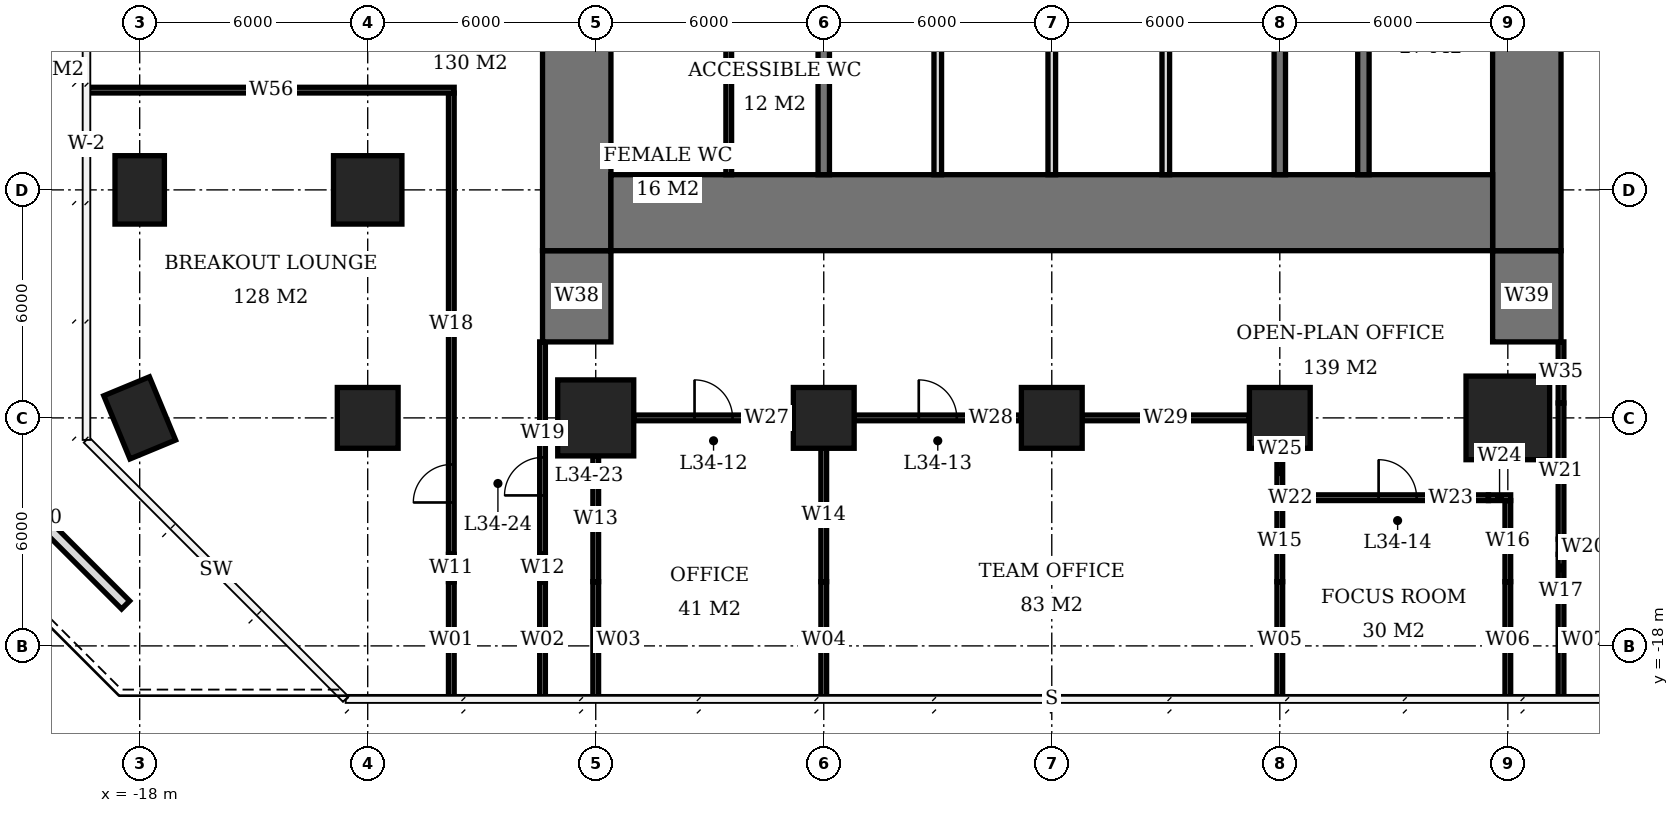
"""IFC4 building model, lengths in metres.
Left out: names, types, materials, properties, quantities, classifications, styles, units other than length and angle.
Written with IfcOpenShell. Run it as: python <this file> out.ifc"""

import sys

from ifc_helpers import new_model, si_unit, direction, frame, frame_2d, origin, origin_2d, place, context, subcontext, project, spatial, rectangle, extrude, element, fill, save


model = new_model("IFC4")
c1 = context("Model", 3, precision=1e-05, world=origin(), true_north=direction((0.0, 1.0)))
c2 = subcontext(c1, "Body", "Model", "MODEL_VIEW")
j1 = project(units=[si_unit("LENGTHUNIT", "METRE"), si_unit("PLANEANGLEUNIT", "RADIAN")], contexts=[c1])
p1 = place(None, origin())
s1 = spatial("IfcSite", under=j1, at=p1, CompositionType="ELEMENT")
p2 = place(p1, origin())
s2 = spatial("IfcBuilding", under=s1, at=p2, CompositionType="ELEMENT")
p3 = place(p2, frame((0.0, 0.0, 140.6)))
s3 = spatial("IfcBuildingStorey", under=s2, at=p3, CompositionType="ELEMENT", Elevation=140.6)
for number, where, z_axis, x_axis in (
    (1, (-18.0, -12.0, 0.0), (0.0, 0.0, 1.0), (-0.383, 0.924, 0.0)),
    (2, (-18.0, -6.0, 0.0), (0.0, 0.0, 1.0), (0.0, 1.0, 0.0)),
):
    element("IfcColumn", number, at=place(p3, frame(where, z_axis=z_axis, x_axis=x_axis)), inside=s3, PredefinedType="COLUMN", context=c2, shape_type="SweptSolid", body=[
        extrude(rectangle(XDim=1.8, YDim=1.3, at=origin_2d()), origin(), (0.0, 0.0, 1.0), 3.9),
    ])
p4 = place(p3, frame((-12.0, -12.0, 0.0), z_axis=(0.0, 0.0, 1.0), x_axis=(1.0, 0.0, 0.0)))
e3 = element("IfcColumn", 3, at=p4, inside=s3, PredefinedType="COLUMN", context=c2, shape_type="SweptSolid", body=[
    extrude(rectangle(XDim=1.6, YDim=1.6, at=origin_2d()), origin(), (0.0, 0.0, 1.0), 3.9),
])
p5 = place(p3, frame((-12.0, -6.0, 0.0), z_axis=(0.0, 0.0, 1.0), x_axis=(1.0, 0.0, 0.0)))
e4 = element("IfcColumn", 4, at=p5, inside=s3, PredefinedType="COLUMN", context=c2, shape_type="SweptSolid", body=[
    extrude(rectangle(XDim=1.8, YDim=1.8, at=origin_2d()), origin(), (0.0, 0.0, 1.0), 3.9),
])
p6 = place(p3, frame((-6.0, -12.0, 0.0), z_axis=(0.0, 0.0, 1.0), x_axis=(1.0, 0.0, 0.0)))
e5 = element("IfcColumn", 5, at=p6, inside=s3, PredefinedType="COLUMN", context=c2, shape_type="SweptSolid", body=[
    extrude(rectangle(XDim=2.0, YDim=2.0, at=origin_2d()), origin(), (0.0, 0.0, 1.0), 3.9),
])
for number, where, z_axis, x_axis in (
    (6, (0.0, -12.0, 0.0), (0.0, 0.0, 1.0), (1.0, 0.0, 0.0)),
    (7, (6.0, -12.0, 0.0), (0.0, 0.0, 1.0), (1.0, 0.0, 0.0)),
    (8, (12.0, -12.0, 0.0), (0.0, 0.0, 1.0), (1.0, 0.0, 0.0)),
):
    element("IfcColumn", number, at=place(p3, frame(where, z_axis=z_axis, x_axis=x_axis)), inside=s3, PredefinedType="COLUMN", context=c2, shape_type="SweptSolid", body=[
        extrude(rectangle(XDim=1.6, YDim=1.6, at=origin_2d()), origin(), (0.0, 0.0, 1.0), 3.9),
    ])
p7 = place(p3, frame((18.0, -12.0, 0.0), z_axis=(0.0, 0.0, 1.0), x_axis=(1.0, 0.0, 0.0)))
e9 = element("IfcColumn", 9, at=p7, inside=s3, PredefinedType="COLUMN", context=c2, shape_type="SweptSolid", body=[
    extrude(rectangle(XDim=2.2, YDim=2.2, at=origin_2d()), origin(), (0.0, 0.0, 1.0), 3.9),
])
p8 = place(p3, frame((-5.6, -6.6, 0.0), z_axis=(0.0, 0.0, 1.0), x_axis=(1.0, 0.0, 0.0)))
e10 = element("IfcWall", 10, at=p8, inside=s3, PredefinedType="SHEAR", context=c2, shape_type="SweptSolid", body=[
    extrude(rectangle(XDim=23.2, YDim=2.0, at=frame_2d((11.6, 0.0))), origin(), (0.0, 0.0, 1.0), 3.9),
])
p9 = place(p3, frame((-6.5, -7.6, 0.0), z_axis=(0.0, 0.0, 1.0), x_axis=(0.0, 1.0, 0.0)))
e11 = element("IfcWall", 11, at=p9, inside=s3, PredefinedType="SHEAR", context=c2, shape_type="SweptSolid", body=[
    extrude(rectangle(XDim=21.2, YDim=1.8, at=frame_2d((10.6, 0.0))), origin(), (0.0, 0.0, 1.0), 3.9),
])
p10 = place(p9, frame((7.8, 0.0, 0.0)))
e12 = element("IfcOpeningElement", 12, at=p10, cuts=e11, PredefinedType="OPENING", context=c2, shape_type="SweptSolid", body=[
    extrude(rectangle(XDim=1.8, YDim=2.4, at=frame_2d((0.9, 1.2))), frame((0.0, 0.91, 0.0), z_axis=(0.0, -1.0, 0.0), x_axis=(1.0, 0.0, 0.0)), (0.0, 0.0, 1.0), 1.82),
])
p11 = place(p3, frame((18.5, -7.6, 0.0), z_axis=(0.0, 0.0, 1.0), x_axis=(0.0, 1.0, 0.0)))
e13 = element("IfcWall", 13, at=p11, inside=s3, PredefinedType="SHEAR", context=c2, shape_type="SweptSolid", body=[
    extrude(rectangle(XDim=21.2, YDim=1.8, at=frame_2d((10.6, 0.0))), origin(), (0.0, 0.0, 1.0), 3.9),
])
p12 = place(p11, frame((9.2, 0.0, 0.0)))
e14 = element("IfcOpeningElement", 14, at=p12, cuts=e13, PredefinedType="OPENING", context=c2, shape_type="SweptSolid", body=[
    extrude(rectangle(XDim=1.8, YDim=2.4, at=frame_2d((0.9, 1.2))), frame((0.0, 0.91, 0.0), z_axis=(0.0, -1.0, 0.0), x_axis=(1.0, 0.0, 0.0)), (0.0, 0.0, 1.0), 1.82),
])
for number, where, z_axis, x_axis in (
    (15, (-6.5, -10.0, 0.0), (0.0, 0.0, 1.0), (0.0, 1.0, 0.0)),
    (16, (18.5, -10.0, 0.0), (0.0, 0.0, 1.0), (0.0, 1.0, 0.0)),
):
    element("IfcWall", number, at=place(p3, frame(where, z_axis=z_axis, x_axis=x_axis)), inside=s3, PredefinedType="SHEAR", context=c2, shape_type="SweptSolid", body=[
        extrude(rectangle(XDim=2.4, YDim=1.8, at=frame_2d((1.2, 0.0))), origin(), (0.0, 0.0, 1.0), 3.9),
    ])
for number, where, z_axis, x_axis in (
    (17, (0.0, -5.6, 0.0), (0.0, 0.0, 1.0), (0.0, 1.0, 0.0)),
    (18, (12.0, -5.6, 0.0), (0.0, 0.0, 1.0), (0.0, 1.0, 0.0)),
):
    element("IfcWall", number, at=place(p3, frame(where, z_axis=z_axis, x_axis=x_axis)), inside=s3, PredefinedType="SHEAR", context=c2, shape_type="SweptSolid", body=[
        extrude(rectangle(XDim=5.45, YDim=0.3, at=frame_2d((2.725, 0.0))), origin(), (0.0, 0.0, 1.0), 3.9),
    ])
p13 = place(p3, frame((14.2, -5.6, 0.0), z_axis=(0.0, 0.0, 1.0), x_axis=(0.0, 1.0, 0.0)))
e19 = element("IfcWall", 19, at=p13, inside=s3, PredefinedType="SHEAR", context=c2, shape_type="SweptSolid", body=[
    extrude(rectangle(XDim=8.45, YDim=0.3, at=frame_2d((4.225, 0.0))), origin(), (0.0, 0.0, 1.0), 3.9),
])
for number, where, z_axis, x_axis in (
    (20, (3.0, -5.6, 0.0), (0.0, 0.0, 1.0), (0.0, 1.0, 0.0)),
    (21, (6.0, -5.6, 0.0), (0.0, 0.0, 1.0), (0.0, 1.0, 0.0)),
    (22, (9.0, -5.6, 0.0), (0.0, 0.0, 1.0), (0.0, 1.0, 0.0)),
):
    element("IfcWall", number, at=place(p3, frame(where, z_axis=z_axis, x_axis=x_axis)), inside=s3, PredefinedType="SOLIDWALL", context=c2, shape_type="SweptSolid", body=[
        extrude(rectangle(XDim=5.45, YDim=0.2, at=frame_2d((2.725, 0.0))), origin(), (0.0, 0.0, 1.0), 3.9),
    ])
p14 = place(p3, frame((-18.37, -16.923, 0.0), z_axis=(0.0, 0.0, 1.0), x_axis=(-0.707106781187, 0.707106781187, 0.0)))
e23 = element("IfcWall", 23, at=p14, inside=s3, PredefinedType="USERDEFINED", context=c2, shape_type="SweptSolid", body=[
    extrude(rectangle(XDim=6.438, YDim=0.3, at=frame_2d((3.219, 0.0))), origin(), (0.0, 0.0, 1.0), 0.6),
])
p15 = place(p3, frame((-2.5, -5.6, 0.0), z_axis=(0.0, 0.0, 1.0), x_axis=(0.0, 1.0, 0.0)))
e24 = element("IfcWall", 24, at=p15, inside=s3, PredefinedType="PLUMBINGWALL", context=c2, shape_type="SweptSolid", body=[
    extrude(rectangle(XDim=5.45, YDim=0.15, at=frame_2d((2.725, 0.0))), origin(), (0.0, 0.0, 1.0), 3.65),
])
p16 = place(p3, frame((11.85, -14.1, 0.0), z_axis=(0.0, 0.0, 1.0), x_axis=(1.0, 0.0, 0.0)))
e25 = element("IfcWall", 25, at=p16, inside=s3, PredefinedType="PARTITIONING", context=c2, shape_type="SweptSolid", body=[
    extrude(rectangle(XDim=0.86, YDim=0.15, at=frame_2d((0.43, 0.0))), origin(), (0.0, 0.0, 1.0), 2.65),
])
p17 = place(p3, frame((12.71, -14.1, 0.0), z_axis=(0.0, 0.0, 1.0), x_axis=(1.0, 0.0, 0.0)))
e26 = element("IfcWall", 26, at=p17, inside=s3, PredefinedType="PARTITIONING", context=c2, shape_type="SweptSolid", body=[
    extrude(rectangle(XDim=4.78, YDim=0.15, at=frame_2d((2.39, 0.0))), origin(), (0.0, 0.0, 1.0), 3.65),
])
p18 = place(p17, frame((1.89, 0.0, 0.0)))
e27 = element("IfcOpeningElement", 27, at=p18, cuts=e26, PredefinedType="OPENING", context=c2, shape_type="SweptSolid", body=[
    extrude(rectangle(XDim=1.0, YDim=2.1, at=frame_2d((0.5, 1.05))), frame((0.0, 0.085, 0.0), z_axis=(0.0, -1.0, 0.0), x_axis=(1.0, 0.0, 0.0)), (0.0, 0.0, 1.0), 0.17),
])
p19 = place(p3, frame((17.49, -14.1, 0.0), z_axis=(0.0, 0.0, 1.0), x_axis=(1.0, 0.0, 0.0)))
e28 = element("IfcWall", 28, at=p19, inside=s3, PredefinedType="PARTITIONING", context=c2, shape_type="SweptSolid", body=[
    extrude(rectangle(XDim=0.585, YDim=0.15, at=frame_2d((0.292, 0.0))), origin(), (0.0, 0.0, 1.0), 2.65),
])
p20 = place(p3, frame((-5.0, -12.0, 0.0), z_axis=(0.0, 0.0, 1.0), x_axis=(1.0, 0.0, 0.0)))
e29 = element("IfcWall", 29, at=p20, inside=s3, PredefinedType="PARTITIONING", context=c2, shape_type="SweptSolid", body=[
    extrude(rectangle(XDim=4.2, YDim=0.15, at=frame_2d((2.1, 0.0))), origin(), (0.0, 0.0, 1.0), 3.65),
])
p21 = place(p20, frame((1.6, 0.0, 0.0)))
e30 = element("IfcOpeningElement", 30, at=p21, cuts=e29, PredefinedType="OPENING", context=c2, shape_type="SweptSolid", body=[
    extrude(rectangle(XDim=1.0, YDim=2.1, at=frame_2d((0.5, 1.05))), frame((0.0, 0.085, 0.0), z_axis=(0.0, -1.0, 0.0), x_axis=(1.0, 0.0, 0.0)), (0.0, 0.0, 1.0), 0.17),
])
p22 = place(p3, frame((0.8, -12.0, 0.0), z_axis=(0.0, 0.0, 1.0), x_axis=(1.0, 0.0, 0.0)))
e31 = element("IfcWall", 31, at=p22, inside=s3, PredefinedType="PARTITIONING", context=c2, shape_type="SweptSolid", body=[
    extrude(rectangle(XDim=4.4, YDim=0.15, at=frame_2d((2.2, 0.0))), origin(), (0.0, 0.0, 1.0), 3.65),
])
p23 = place(p22, frame((1.7, 0.0, 0.0)))
e32 = element("IfcOpeningElement", 32, at=p23, cuts=e31, PredefinedType="OPENING", context=c2, shape_type="SweptSolid", body=[
    extrude(rectangle(XDim=1.0, YDim=2.1, at=frame_2d((0.5, 1.05))), frame((0.0, 0.085, 0.0), z_axis=(0.0, -1.0, 0.0), x_axis=(1.0, 0.0, 0.0)), (0.0, 0.0, 1.0), 0.17),
])
p24 = place(p3, frame((6.8, -12.0, 0.0), z_axis=(0.0, 0.0, 1.0), x_axis=(1.0, 0.0, 0.0)))
e33 = element("IfcWall", 33, at=p24, inside=s3, PredefinedType="PARTITIONING", context=c2, shape_type="SweptSolid", body=[
    extrude(rectangle(XDim=4.4, YDim=0.15, at=frame_2d((2.2, 0.0))), origin(), (0.0, 0.0, 1.0), 3.65),
])
p25 = place(p3, frame((-6.0, -19.4, 0.0), z_axis=(0.0, 0.0, 1.0), x_axis=(0.0, 1.0, 0.0)))
e34 = element("IfcWall", 34, at=p25, inside=s3, PredefinedType="PARTITIONING", context=c2, shape_type="SweptSolid", body=[
    extrude(rectangle(XDim=3.09, YDim=0.15, at=frame_2d((1.545, 0.0))), origin(), (0.0, 0.0, 1.0), 3.65),
])
p26 = place(p3, frame((-6.0, -16.31, 0.0), z_axis=(0.0, 0.0, 1.0), x_axis=(0.0, 1.0, 0.0)))
e35 = element("IfcWall", 35, at=p26, inside=s3, PredefinedType="PARTITIONING", context=c2, shape_type="SweptSolid", body=[
    extrude(rectangle(XDim=3.31, YDim=0.15, at=frame_2d((1.655, 0.0))), origin(), (0.0, 0.0, 1.0), 2.65),
])
p27 = place(p3, frame((0.0, -19.4, 0.0), z_axis=(0.0, 0.0, 1.0), x_axis=(0.0, 1.0, 0.0)))
e36 = element("IfcWall", 36, at=p27, inside=s3, PredefinedType="PARTITIONING", context=c2, shape_type="SweptSolid", body=[
    extrude(rectangle(XDim=3.09, YDim=0.15, at=frame_2d((1.545, 0.0))), origin(), (0.0, 0.0, 1.0), 3.65),
])
p28 = place(p3, frame((0.0, -16.31, 0.0), z_axis=(0.0, 0.0, 1.0), x_axis=(0.0, 1.0, 0.0)))
e37 = element("IfcWall", 37, at=p28, inside=s3, PredefinedType="PARTITIONING", context=c2, shape_type="SweptSolid", body=[
    extrude(rectangle(XDim=3.51, YDim=0.15, at=frame_2d((1.755, 0.0))), origin(), (0.0, 0.0, 1.0), 2.65),
])
p29 = place(p3, frame((12.0, -19.4, 0.0), z_axis=(0.0, 0.0, 1.0), x_axis=(0.0, 1.0, 0.0)))
e38 = element("IfcWall", 38, at=p29, inside=s3, PredefinedType="PARTITIONING", context=c2, shape_type="SweptSolid", body=[
    extrude(rectangle(XDim=3.09, YDim=0.15, at=frame_2d((1.545, 0.0))), origin(), (0.0, 0.0, 1.0), 3.65),
])
p30 = place(p3, frame((12.0, -16.31, 0.0), z_axis=(0.0, 0.0, 1.0), x_axis=(0.0, 1.0, 0.0)))
e39 = element("IfcWall", 39, at=p30, inside=s3, PredefinedType="PARTITIONING", context=c2, shape_type="SweptSolid", body=[
    extrude(rectangle(XDim=2.135, YDim=0.15, at=frame_2d((1.067, 0.0))), origin(), (0.0, 0.0, 1.0), 2.65),
])
p31 = place(p3, frame((12.0, -14.025, 0.0), z_axis=(0.0, 0.0, 1.0), x_axis=(0.0, 1.0, 0.0)))
e40 = element("IfcWall", 40, at=p31, inside=s3, PredefinedType="PARTITIONING", context=c2, shape_type="SweptSolid", body=[
    extrude(rectangle(XDim=1.225, YDim=0.15, at=frame_2d((0.612, 0.0))), origin(), (0.0, 0.0, 1.0), 2.65),
])
p32 = place(p3, frame((18.0, -19.4, 0.0), z_axis=(0.0, 0.0, 1.0), x_axis=(0.0, 1.0, 0.0)))
e41 = element("IfcWall", 41, at=p32, inside=s3, PredefinedType="PARTITIONING", context=c2, shape_type="SweptSolid", body=[
    extrude(rectangle(XDim=3.09, YDim=0.15, at=frame_2d((1.545, 0.0))), origin(), (0.0, 0.0, 1.0), 3.65),
])
p33 = place(p3, frame((18.0, -16.31, 0.0), z_axis=(0.0, 0.0, 1.0), x_axis=(0.0, 1.0, 0.0)))
e42 = element("IfcWall", 42, at=p33, inside=s3, PredefinedType="PARTITIONING", context=c2, shape_type="SweptSolid", body=[
    extrude(rectangle(XDim=2.135, YDim=0.15, at=frame_2d((1.067, 0.0))), origin(), (0.0, 0.0, 1.0), 2.65),
])
p34 = place(p3, frame((-19.35, -3.375, 0.0), z_axis=(0.0, 0.0, 1.0), x_axis=(1.0, 0.0, 0.0)))
e43 = element("IfcWall", 43, at=p34, inside=s3, PredefinedType="PARTITIONING", context=c2, shape_type="SweptSolid", body=[
    extrude(rectangle(XDim=9.625, YDim=0.15, at=frame_2d((4.812, 0.0))), origin(), (0.0, 0.0, 1.0), 3.65),
])
p35 = place(p3, frame((-9.8, -19.4, 0.0), z_axis=(0.0, 0.0, 1.0), x_axis=(0.0, 1.0, 0.0)))
e44 = element("IfcWall", 44, at=p35, inside=s3, PredefinedType="PARTITIONING", context=c2, shape_type="SweptSolid", body=[
    extrude(rectangle(XDim=3.09, YDim=0.15, at=frame_2d((1.545, 0.0))), origin(), (0.0, 0.0, 1.0), 3.65),
])
p36 = place(p3, frame((-9.8, -16.31, 0.0), z_axis=(0.0, 0.0, 1.0), x_axis=(0.0, 1.0, 0.0)))
e45 = element("IfcWall", 45, at=p36, inside=s3, PredefinedType="PARTITIONING", context=c2, shape_type="SweptSolid", body=[
    extrude(rectangle(XDim=0.72, YDim=0.15, at=frame_2d((0.36, 0.0))), origin(), (0.0, 0.0, 1.0), 2.65),
])
p37 = place(p3, frame((-9.8, -15.59, 0.0), z_axis=(0.0, 0.0, 1.0), x_axis=(0.0, 1.0, 0.0)))
e46 = element("IfcWall", 46, at=p37, inside=s3, PredefinedType="PARTITIONING", context=c2, shape_type="SweptSolid", body=[
    extrude(rectangle(XDim=12.14, YDim=0.15, at=frame_2d((6.07, 0.0))), origin(), (0.0, 0.0, 1.0), 3.65),
])
p38 = place(p37, frame((1.364, 0.0, 0.0)))
e47 = element("IfcOpeningElement", 47, at=p38, cuts=e46, PredefinedType="OPENING", context=c2, shape_type="SweptSolid", body=[
    extrude(rectangle(XDim=1.0, YDim=2.1, at=frame_2d((0.5, 1.05))), frame((0.0, 0.085, 0.0), z_axis=(0.0, -1.0, 0.0), x_axis=(1.0, 0.0, 0.0)), (0.0, 0.0, 1.0), 0.17),
])
p39 = place(p3, frame((-7.4, -19.4, 0.0), z_axis=(0.0, 0.0, 1.0), x_axis=(0.0, 1.0, 0.0)))
e48 = element("IfcWall", 48, at=p39, inside=s3, PredefinedType="PARTITIONING", context=c2, shape_type="SweptSolid", body=[
    extrude(rectangle(XDim=3.09, YDim=0.15, at=frame_2d((1.545, 0.0))), origin(), (0.0, 0.0, 1.0), 3.65),
])
p40 = place(p3, frame((-7.4, -16.31, 0.0), z_axis=(0.0, 0.0, 1.0), x_axis=(0.0, 1.0, 0.0)))
e49 = element("IfcWall", 49, at=p40, inside=s3, PredefinedType="PARTITIONING", context=c2, shape_type="SweptSolid", body=[
    extrude(rectangle(XDim=0.72, YDim=0.15, at=frame_2d((0.36, 0.0))), origin(), (0.0, 0.0, 1.0), 2.65),
])
p41 = place(p3, frame((-7.4, -15.59, 0.0), z_axis=(0.0, 0.0, 1.0), x_axis=(0.0, 1.0, 0.0)))
e50 = element("IfcWall", 50, at=p41, inside=s3, PredefinedType="PARTITIONING", context=c2, shape_type="SweptSolid", body=[
    extrude(rectangle(XDim=5.59, YDim=0.15, at=frame_2d((2.795, 0.0))), origin(), (0.0, 0.0, 1.0), 3.65),
])
p42 = place(p41, frame((1.55, 0.0, 0.0)))
e51 = element("IfcOpeningElement", 51, at=p42, cuts=e50, PredefinedType="OPENING", context=c2, shape_type="SweptSolid", body=[
    extrude(rectangle(XDim=1.0, YDim=2.1, at=frame_2d((0.5, 1.05))), frame((0.0, 0.085, 0.0), z_axis=(0.0, -1.0, 0.0), x_axis=(1.0, 0.0, 0.0)), (0.0, 0.0, 1.0), 0.17),
])
p43 = place(p3, frame((19.4, -19.4, 0.0), z_axis=(0.0, 0.0, 1.0), x_axis=(0.0, 1.0, 0.0)))
e52 = element("IfcWall", 52, at=p43, inside=s3, PredefinedType="PARTITIONING", context=c2, shape_type="SweptSolid", body=[
    extrude(rectangle(XDim=3.09, YDim=0.15, at=frame_2d((1.545, 0.0))), origin(), (0.0, 0.0, 1.0), 3.65),
])
p44 = place(p3, frame((19.4, -16.31, 0.0), z_axis=(0.0, 0.0, 1.0), x_axis=(0.0, 1.0, 0.0)))
e53 = element("IfcWall", 53, at=p44, inside=s3, PredefinedType="PARTITIONING", context=c2, shape_type="SweptSolid", body=[
    extrude(rectangle(XDim=0.72, YDim=0.15, at=frame_2d((0.36, 0.0))), origin(), (0.0, 0.0, 1.0), 2.65),
])
p45 = place(p3, frame((19.4, -15.59, 0.0), z_axis=(0.0, 0.0, 1.0), x_axis=(0.0, 1.0, 0.0)))
e54 = element("IfcWall", 54, at=p45, inside=s3, PredefinedType="PARTITIONING", context=c2, shape_type="SweptSolid", body=[
    extrude(rectangle(XDim=0.398, YDim=0.15, at=frame_2d((0.199, 0.0))), origin(), (0.0, 0.0, 1.0), 3.65),
])
p46 = place(p3, frame((19.4, -15.192, 0.0), z_axis=(0.0, 0.0, 1.0), x_axis=(0.0, 1.0, 0.0)))
e55 = element("IfcWall", 55, at=p46, inside=s3, PredefinedType="PARTITIONING", context=c2, shape_type="SweptSolid", body=[
    extrude(rectangle(XDim=3.584, YDim=0.15, at=frame_2d((1.792, 0.0))), origin(), (0.0, 0.0, 1.0), 2.65),
])
p47 = place(p3, frame((19.4, -11.608, 0.0), z_axis=(0.0, 0.0, 1.0), x_axis=(0.0, 1.0, 0.0)))
e56 = element("IfcWall", 56, at=p47, inside=s3, PredefinedType="PARTITIONING", context=c2, shape_type="SweptSolid", body=[
    extrude(rectangle(XDim=1.608, YDim=0.15, at=frame_2d((0.804, 0.0))), origin(), (0.0, 0.0, 1.0), 3.65),
])
p48 = place(p21, origin())
e57 = element("IfcDoor", 57, at=p48, inside=s3, OperationType="SINGLE_SWING_LEFT", PredefinedType="DOOR", context=c2, shape_type="SweptSolid", body=[
    extrude(rectangle(XDim=1.0, YDim=2.1, at=frame_2d((0.5, 1.05))), frame((0.0, 0.025, 0.0), z_axis=(0.0, -1.0, 0.0), x_axis=(1.0, 0.0, 0.0)), (0.0, 0.0, 1.0), 0.05),
])
fill(e30, e57)
p49 = place(p23, origin())
e58 = element("IfcDoor", 58, at=p49, inside=s3, OperationType="SINGLE_SWING_LEFT", PredefinedType="DOOR", context=c2, shape_type="SweptSolid", body=[
    extrude(rectangle(XDim=1.0, YDim=2.1, at=frame_2d((0.5, 1.05))), frame((0.0, 0.025, 0.0), z_axis=(0.0, -1.0, 0.0), x_axis=(1.0, 0.0, 0.0)), (0.0, 0.0, 1.0), 0.05),
])
fill(e32, e58)
p50 = place(p18, origin())
e59 = element("IfcDoor", 59, at=p50, inside=s3, OperationType="SINGLE_SWING_LEFT", PredefinedType="DOOR", context=c2, shape_type="SweptSolid", body=[
    extrude(rectangle(XDim=1.0, YDim=2.1, at=frame_2d((0.5, 1.05))), frame((0.0, 0.025, 0.0), z_axis=(0.0, -1.0, 0.0), x_axis=(1.0, 0.0, 0.0)), (0.0, 0.0, 1.0), 0.05),
])
fill(e27, e59)
p51 = place(p42, origin())
e60 = element("IfcDoor", 60, at=p51, inside=s3, OperationType="SINGLE_SWING_LEFT", PredefinedType="DOOR", context=c2, shape_type="SweptSolid", body=[
    extrude(rectangle(XDim=1.0, YDim=2.1, at=frame_2d((0.5, 1.05))), frame((0.0, 0.025, 0.0), z_axis=(0.0, -1.0, 0.0), x_axis=(1.0, 0.0, 0.0)), (0.0, 0.0, 1.0), 0.05),
])
fill(e51, e60)
p52 = place(p38, origin())
e61 = element("IfcDoor", 61, at=p52, inside=s3, OperationType="SINGLE_SWING_LEFT", PredefinedType="DOOR", context=c2, shape_type="SweptSolid", body=[
    extrude(rectangle(XDim=1.0, YDim=2.1, at=frame_2d((0.5, 1.05))), frame((0.0, 0.025, 0.0), z_axis=(0.0, -1.0, 0.0), x_axis=(1.0, 0.0, 0.0)), (0.0, 0.0, 1.0), 0.05),
])
fill(e47, e61)
save(model, sys.argv[1])
